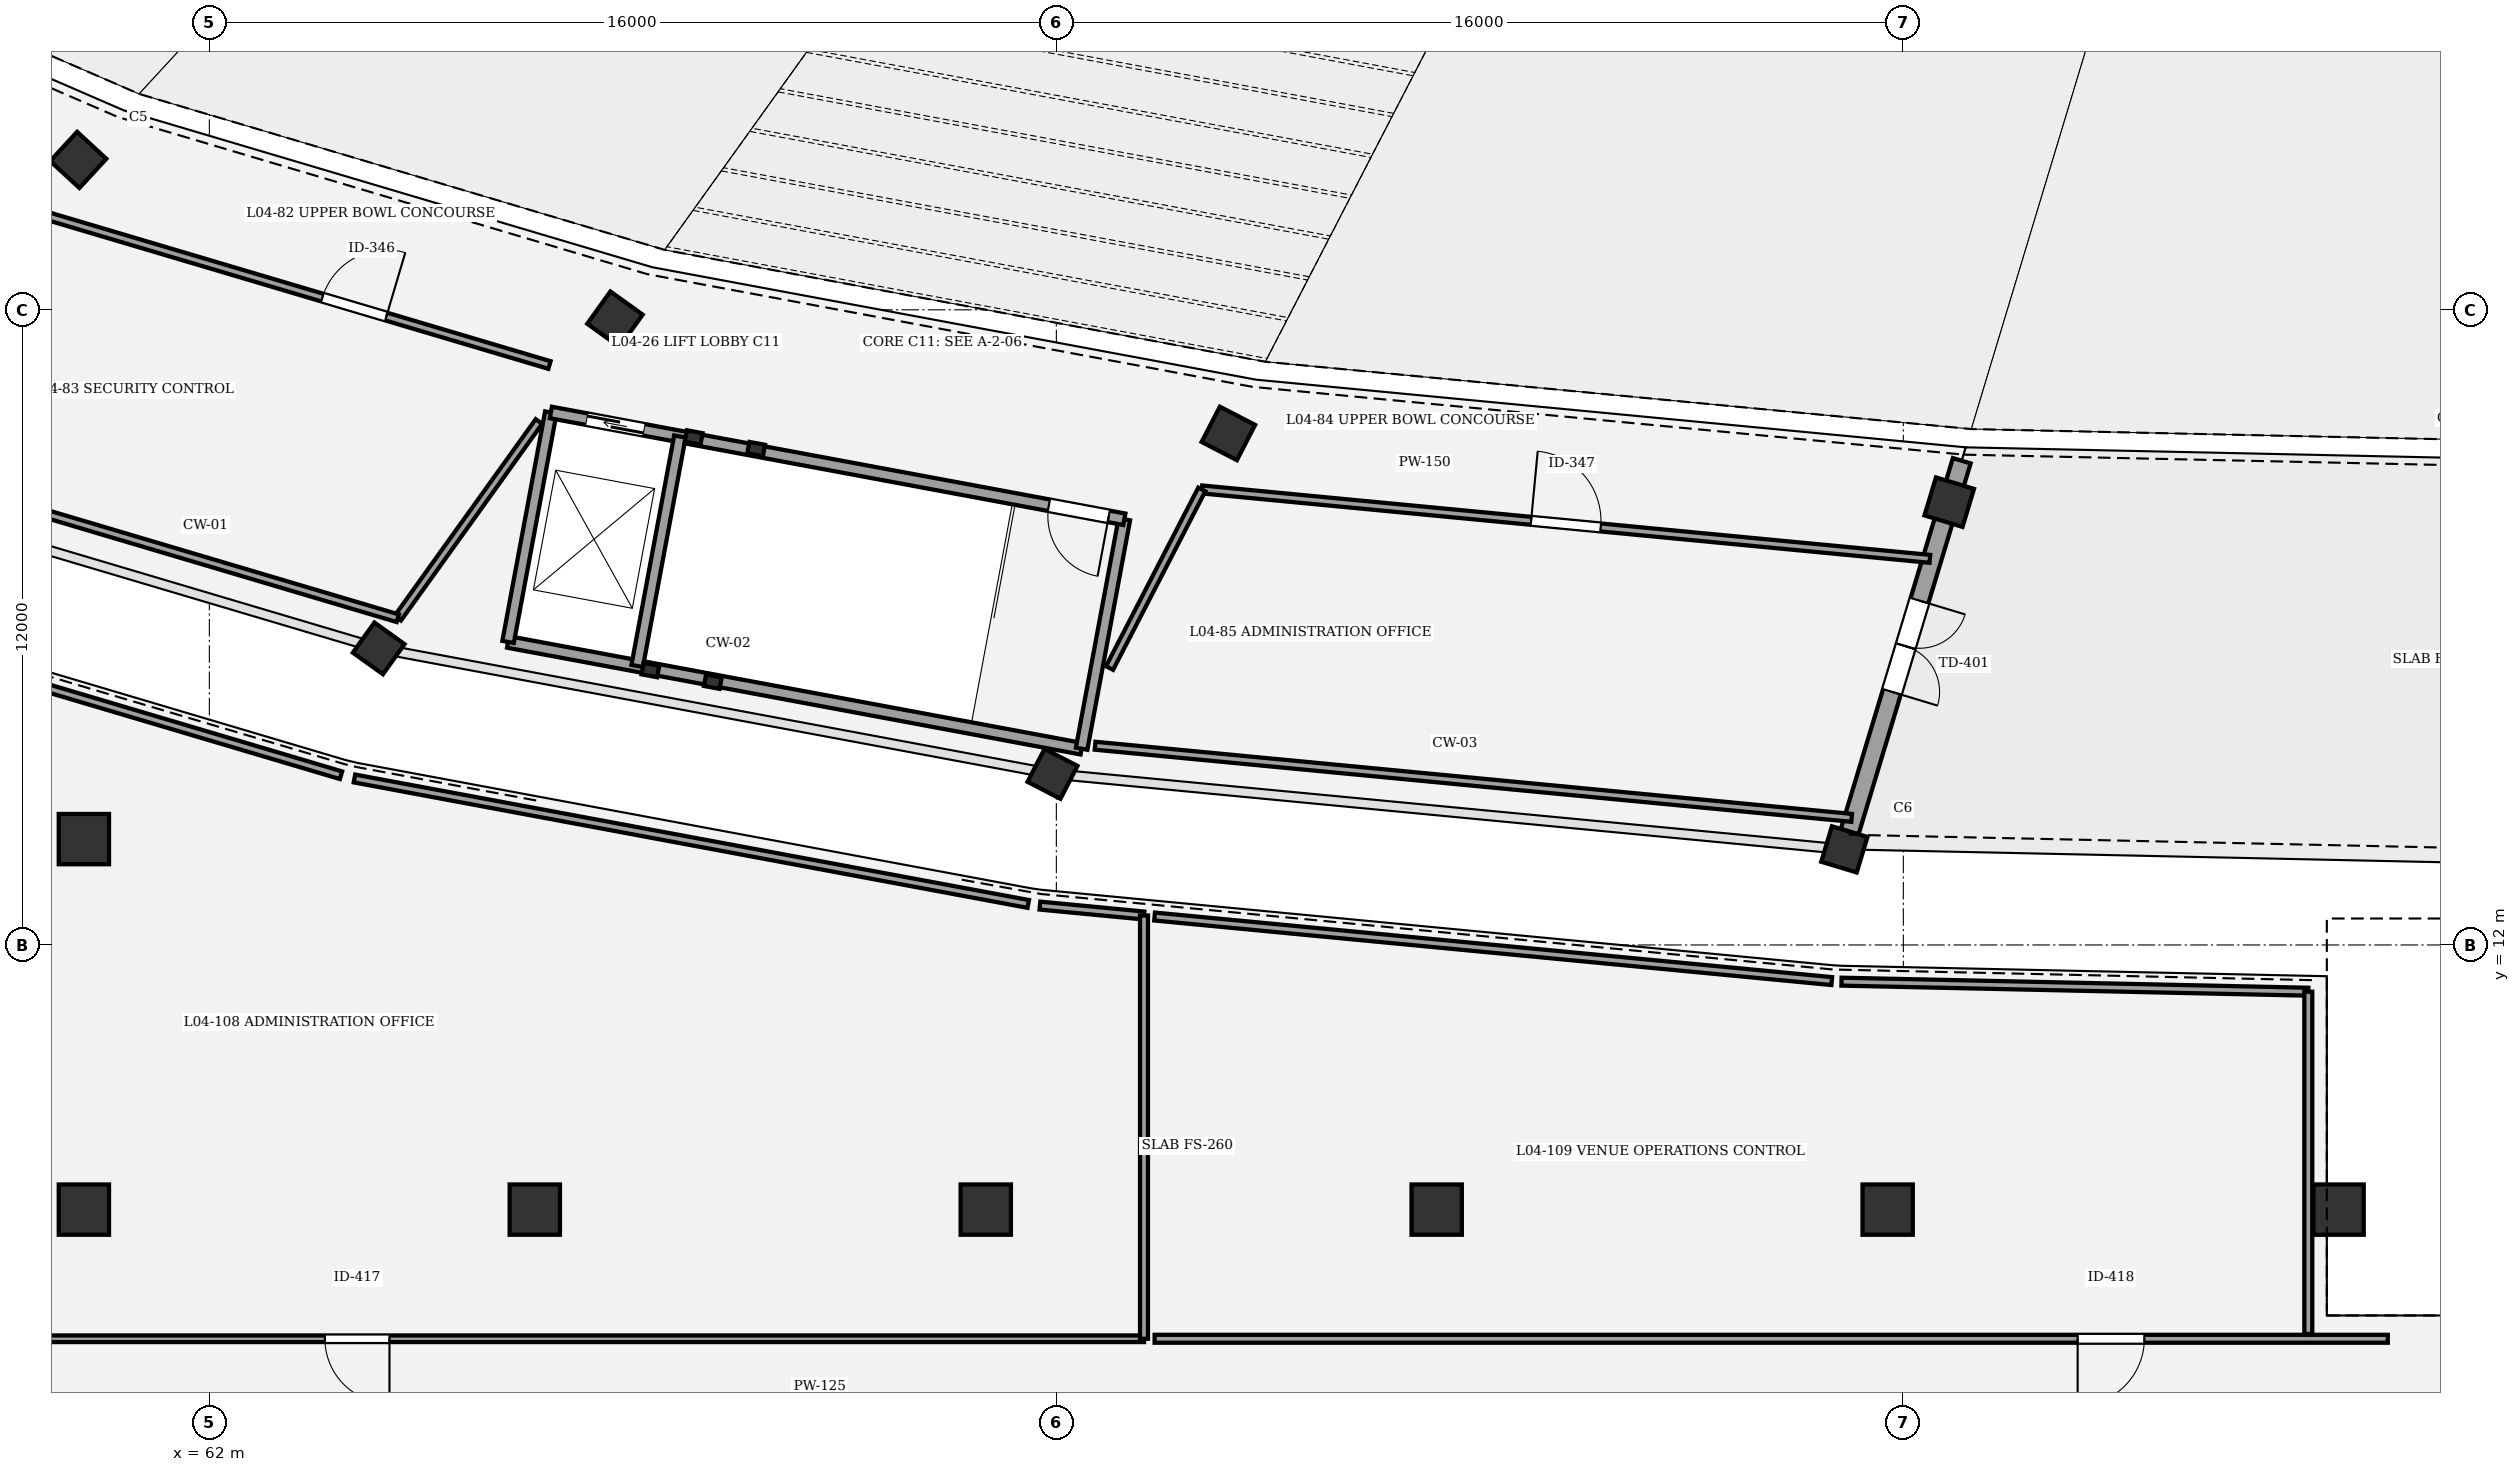
"""IFC4 building model, lengths in metres.
Left out: names, types, materials, properties, quantities, classifications, styles, units other than length and angle.
Written with IfcOpenShell. Run it as: python <this file> out.ifc"""

import sys

from ifc_helpers import new_model, si_unit, direction, frame, frame_2d, origin, origin_2d, place, context, subcontext, project, spatial, rectangle, circle, extrude, element, fill, save


model = new_model("IFC4")
c1 = context("Model", 3, precision=1e-05, world=origin(), true_north=direction((0.0, 1.0)))
c2 = subcontext(c1, "Body", "Model", "MODEL_VIEW")
j1 = project(units=[si_unit("LENGTHUNIT", "METRE"), si_unit("PLANEANGLEUNIT", "RADIAN")], contexts=[c1])
p1 = place(None, origin())
s1 = spatial("IfcSite", under=j1, at=p1, CompositionType="ELEMENT")
p2 = place(p1, origin())
s2 = spatial("IfcBuilding", under=s1, at=p2, CompositionType="ELEMENT")
p3 = place(p2, frame((0.0, 0.0, 19.2)))
s3 = spatial("IfcBuildingStorey", under=s2, at=p3, CompositionType="ELEMENT", Elevation=19.2)
for number, where, z_axis, x_axis in (
    (1, (59.524, 26.832, 0.0), (0.0, 0.0, 1.0), (-0.678, -0.735, 0.0)),
    (2, (69.662, 23.823, 0.0), (0.0, 0.0, 1.0), (-0.583, -0.812, 0.0)),
):
    element("IfcColumn", number, at=place(p3, frame(where, z_axis=z_axis, x_axis=x_axis)), inside=s3, PredefinedType="COLUMN", context=c2, shape_type="SweptSolid", body=[
        extrude(rectangle(XDim=0.75, YDim=0.75, at=origin_2d()), origin(), (0.0, 0.0, 1.0), 4.8),
    ])
p4 = place(p3, frame((65.199, 17.603, 0.0), z_axis=(0.0, 0.0, 1.0), x_axis=(-0.582974127943, -0.812490717577, 0.0)))
e3 = element("IfcColumn", 3, at=p4, inside=s3, PredefinedType="COLUMN", context=c2, shape_type="SweptSolid", body=[
    extrude(rectangle(XDim=0.7, YDim=0.7, at=origin_2d()), origin(), (0.0, 0.0, 1.0), 4.8),
])
p5 = place(p3, frame((81.25, 21.665, 0.0), z_axis=(0.0, 0.0, 1.0), x_axis=(-0.458959712465, -0.888457079624, 0.0)))
e4 = element("IfcColumn", 4, at=p5, inside=s3, PredefinedType="COLUMN", context=c2, shape_type="SweptSolid", body=[
    extrude(rectangle(XDim=0.75, YDim=0.75, at=origin_2d()), origin(), (0.0, 0.0, 1.0), 4.8),
])
p6 = place(p3, frame((77.927, 15.233, 0.0), z_axis=(0.0, 0.0, 1.0), x_axis=(-0.458959712465, -0.888457079624, 0.0)))
e5 = element("IfcColumn", 5, at=p6, inside=s3, PredefinedType="COLUMN", context=c2, shape_type="SweptSolid", body=[
    extrude(rectangle(XDim=0.7, YDim=0.7, at=origin_2d()), origin(), (0.0, 0.0, 1.0), 4.8),
])
p7 = place(p3, frame((94.867, 20.366, 0.0), z_axis=(0.0, 0.0, 1.0), x_axis=(-0.289198876314, -0.957269037387, 0.0)))
e6 = element("IfcColumn", 6, at=p7, inside=s3, PredefinedType="COLUMN", context=c2, shape_type="SweptSolid", body=[
    extrude(rectangle(XDim=0.75, YDim=0.75, at=origin_2d()), origin(), (0.0, 0.0, 1.0), 4.8),
])
p8 = place(p3, frame((92.885, 13.806, 0.0), z_axis=(0.0, 0.0, 1.0), x_axis=(-0.289198876314, -0.957269037387, 0.0)))
e7 = element("IfcColumn", 7, at=p8, inside=s3, PredefinedType="COLUMN", context=c2, shape_type="SweptSolid", body=[
    extrude(rectangle(XDim=0.7, YDim=0.7, at=origin_2d()), origin(), (0.0, 0.0, 1.0), 4.8),
])
for number, where, z_axis, x_axis in (
    (8, (59.63, 7.0, 0.0), (0.0, 0.0, 1.0), (1.0, 0.0, 0.0)),
    (9, (59.63, 14.0, 0.0), (0.0, 0.0, 1.0), (1.0, 0.0, 0.0)),
    (10, (68.148, 7.0, 0.0), (0.0, 0.0, 1.0), (1.0, 0.0, 0.0)),
    (11, (76.667, 7.0, 0.0), (0.0, 0.0, 1.0), (1.0, 0.0, 0.0)),
    (12, (85.185, 7.0, 0.0), (0.0, 0.0, 1.0), (1.0, 0.0, 0.0)),
    (13, (93.704, 7.0, 0.0), (0.0, 0.0, 1.0), (1.0, 0.0, 0.0)),
    (14, (102.222, 7.0, 0.0), (0.0, 0.0, 1.0), (1.0, 0.0, 0.0)),
):
    element("IfcColumn", number, at=place(p3, frame(where, z_axis=z_axis, x_axis=x_axis)), inside=s3, PredefinedType="COLUMN", context=c2, shape_type="SweptSolid", body=[
        extrude(circle(Radius=0.475, at=origin_2d()), origin(), (0.0, 0.0, 1.0), 4.8),
    ])
p9 = place(p3, frame((95.104, 21.149, 0.0), z_axis=(0.0, 0.0, 1.0), x_axis=(-0.28924385285, -0.957255448451, 0.0)))
e15 = element("IfcWall", 15, at=p9, inside=s3, PredefinedType="STANDARD", context=c2, shape_type="SweptSolid", body=[
    extrude(rectangle(XDim=7.322, YDim=0.35, at=frame_2d((3.661, 0.0))), origin(), (0.0, 0.0, 1.0), 3.55),
])
p10 = place(p9, frame((2.761, 0.0, 0.0)))
e16 = element("IfcOpeningElement", 16, at=p10, cuts=e15, PredefinedType="OPENING", context=c2, shape_type="SweptSolid", body=[
    extrude(rectangle(XDim=1.8, YDim=2.25, at=frame_2d((0.9, 1.125))), frame((0.0, 0.185, 0.0), z_axis=(0.0, -1.0, 0.0), x_axis=(1.0, 0.0, 0.0)), (0.0, 0.0, 1.0), 0.37),
])
for number, where, z_axis, x_axis in (
    (17, (72.33, 21.369, 0.0), (0.0, 0.0, 1.0), (-0.983, 0.183, 0.0)),
    (18, (71.15, 21.588, 0.0), (0.0, 0.0, 1.0), (-0.983, 0.183, 0.0)),
    (19, (70.332, 17.194, 0.0), (0.0, 0.0, 1.0), (-0.983, 0.183, 0.0)),
    (20, (71.511, 16.974, 0.0), (0.0, 0.0, 1.0), (-0.983, 0.183, 0.0)),
):
    element("IfcColumn", number, at=place(p3, frame(where, z_axis=z_axis, x_axis=x_axis)), inside=s3, PredefinedType="COLUMN", context=c2, shape_type="SweptSolid", body=[
        extrude(rectangle(XDim=0.3, YDim=0.22, at=origin_2d()), origin(), (0.0, 0.0, 1.0), 4.8),
    ])
p11 = place(p3, frame((78.477, 15.707, 0.0), z_axis=(0.0, 0.0, 1.0), x_axis=(-0.983093434234, 0.183104613723, 0.0)))
e21 = element("IfcWall", 21, at=p11, inside=s3, PredefinedType="SHEAR", context=c2, shape_type="SweptSolid", body=[
    extrude(rectangle(XDim=11.02, YDim=0.22, at=frame_2d((5.51, 0.0))), origin(), (0.0, 0.0, 1.0), 4.55),
])
for number, where, z_axis, x_axis in (
    (22, (79.285, 20.043, 0.0), (0.0, 0.0, 1.0), (-0.183, -0.983, 0.0)),
    (23, (68.451, 22.061, 0.0), (0.0, 0.0, 1.0), (-0.183, -0.983, 0.0)),
):
    element("IfcWall", number, at=place(p3, frame(where, z_axis=z_axis, x_axis=x_axis)), inside=s3, PredefinedType="SHEAR", context=c2, shape_type="SweptSolid", body=[
        extrude(rectangle(XDim=4.41, YDim=0.22, at=frame_2d((2.205, 0.0))), origin(), (0.0, 0.0, 1.0), 4.55),
    ])
p12 = place(p3, frame((79.285, 20.043, 0.0), z_axis=(0.0, 0.0, 1.0), x_axis=(-0.983093434234, 0.183104613723, 0.0)))
e24 = element("IfcWall", 24, at=p12, inside=s3, PredefinedType="SHEAR", context=c2, shape_type="SweptSolid", body=[
    extrude(rectangle(XDim=11.02, YDim=0.22, at=frame_2d((5.51, 0.0))), origin(), (0.0, 0.0, 1.0), 4.55),
])
p13 = place(p12, frame((0.3, 0.0, 0.0)))
e25 = element("IfcOpeningElement", 25, at=p13, cuts=e24, PredefinedType="OPENING", context=c2, shape_type="SweptSolid", body=[
    extrude(rectangle(XDim=1.15, YDim=2.15, at=frame_2d((0.575, 1.075))), frame((0.0, 0.12, 0.0), z_axis=(0.0, -1.0, 0.0), x_axis=(1.0, 0.0, 0.0)), (0.0, 0.0, 1.0), 0.24),
])
p14 = place(p12, frame((9.23, 0.0, 0.0)))
e26 = element("IfcOpeningElement", 26, at=p14, cuts=e24, PredefinedType="OPENING", context=c2, shape_type="SweptSolid", body=[
    extrude(rectangle(XDim=1.1, YDim=2.15, at=frame_2d((0.55, 1.075))), frame((0.0, 0.12, 0.0), z_axis=(0.0, -1.0, 0.0), x_axis=(1.0, 0.0, 0.0)), (0.0, 0.0, 1.0), 0.24),
])
p15 = place(p3, frame((70.889, 21.606, 0.0), z_axis=(0.0, 0.0, 1.0), x_axis=(-0.183078394814, -0.983098317236, 0.0)))
e27 = element("IfcWall", 27, at=p15, inside=s3, PredefinedType="SHEAR", context=c2, shape_type="SweptSolid", body=[
    extrude(rectangle(XDim=4.41, YDim=0.22, at=frame_2d((2.205, 0.0))), origin(), (0.0, 0.0, 1.0), 4.55),
])
p16 = place(p3, frame((58.674, 25.851, 0.0), z_axis=(0.0, 0.0, 1.0), x_axis=(0.95865924659, -0.284556582997, 0.0)))
e28 = element("IfcWall", 28, at=p16, inside=s3, PredefinedType="PARTITIONING", context=c2, shape_type="SweptSolid", body=[
    extrude(rectangle(XDim=10.171, YDim=0.15, at=frame_2d((5.085, 0.0))), origin(), (0.0, 0.0, 1.0), 3.55),
])
p17 = place(p16, frame((5.696, 0.0, 0.0)))
e29 = element("IfcOpeningElement", 29, at=p17, cuts=e28, PredefinedType="OPENING", context=c2, shape_type="SweptSolid", body=[
    extrude(rectangle(XDim=1.26, YDim=2.2, at=frame_2d((0.63, 1.1))), frame((0.0, 0.085, 0.0), z_axis=(0.0, -1.0, 0.0), x_axis=(1.0, 0.0, 0.0)), (0.0, 0.0, 1.0), 0.17),
])
p18 = place(p3, frame((80.748, 20.607, 0.0), z_axis=(0.0, 0.0, 1.0), x_axis=(0.99548251799, -0.094945017647, 0.0)))
e30 = element("IfcWall", 30, at=p18, inside=s3, PredefinedType="PARTITIONING", context=c2, shape_type="SweptSolid", body=[
    extrude(rectangle(XDim=13.816, YDim=0.15, at=frame_2d((6.908, 0.0))), origin(), (0.0, 0.0, 1.0), 3.55),
])
p19 = place(p18, frame((6.248, 0.0, 0.0)))
e31 = element("IfcOpeningElement", 31, at=p19, cuts=e30, PredefinedType="OPENING", context=c2, shape_type="SweptSolid", body=[
    extrude(rectangle(XDim=1.32, YDim=2.2, at=frame_2d((0.66, 1.1))), frame((0.0, 0.085, 0.0), z_axis=(0.0, -1.0, 0.0), x_axis=(1.0, 0.0, 0.0)), (0.0, 0.0, 1.0), 0.17),
])
p20 = place(p3, frame((79.656, 4.56, 0.0), z_axis=(0.0, 0.0, 1.0), x_axis=(-1.0, 0.0, 0.0)))
e32 = element("IfcWall", 32, at=p20, inside=s3, PredefinedType="PARTITIONING", context=c2, shape_type="SweptSolid", body=[
    extrude(rectangle(XDim=23.296, YDim=0.125, at=frame_2d((11.648, 0.0))), origin(), (0.0, 0.0, 1.0), 3.55),
])
p21 = place(p20, frame((14.253, 0.0, 0.0)))
e33 = element("IfcOpeningElement", 33, at=p21, cuts=e32, PredefinedType="OPENING", context=c2, shape_type="SweptSolid", body=[
    extrude(rectangle(XDim=1.22, YDim=2.2, at=frame_2d((0.61, 1.1))), frame((0.0, 0.073, 0.0), z_axis=(0.0, -1.0, 0.0), x_axis=(1.0, 0.0, 0.0)), (0.0, 0.0, 1.0), 0.145),
])
p22 = place(p3, frame((103.152, 4.56, 0.0), z_axis=(0.0, 0.0, 1.0), x_axis=(-1.0, 0.0, 0.0)))
e34 = element("IfcWall", 34, at=p22, inside=s3, PredefinedType="PARTITIONING", context=c2, shape_type="SweptSolid", body=[
    extrude(rectangle(XDim=23.296, YDim=0.15, at=frame_2d((11.648, 0.0))), origin(), (0.0, 0.0, 1.0), 3.55),
])
p23 = place(p22, frame((4.599, 0.0, 0.0)))
e35 = element("IfcOpeningElement", 35, at=p23, cuts=e34, PredefinedType="OPENING", context=c2, shape_type="SweptSolid", body=[
    extrude(rectangle(XDim=1.26, YDim=2.2, at=frame_2d((0.63, 1.1))), frame((0.0, 0.085, 0.0), z_axis=(0.0, -1.0, 0.0), x_axis=(1.0, 0.0, 0.0)), (0.0, 0.0, 1.0), 0.17),
])
p24 = place(p3, frame((68.226, 21.89, 0.0), z_axis=(0.0, 0.0, 1.0), x_axis=(-0.583018940517, -0.812458562019, 0.0)))
e36 = element("IfcWall", 36, at=p24, inside=s3, PredefinedType="PARTITIONING", context=c2, shape_type="SweptSolid", body=[
    extrude(rectangle(XDim=4.574, YDim=0.15, at=frame_2d((2.287, 0.0))), origin(), (0.0, 0.0, 1.0), 3.55),
])
p25 = place(p3, frame((65.559, 18.173, 0.0), z_axis=(0.0, 0.0, 1.0), x_axis=(-0.958657149099, 0.284563649264, 0.0)))
e37 = element("IfcWall", 37, at=p25, inside=s3, PredefinedType="PARTITIONING", context=c2, shape_type="SweptSolid", body=[
    extrude(rectangle(XDim=11.437, YDim=0.15, at=frame_2d((5.718, 0.0))), origin(), (0.0, 0.0, 1.0), 3.55),
])
p26 = place(p3, frame((79.005, 17.233, 0.0), z_axis=(0.0, 0.0, 1.0), x_axis=(0.45895239375, 0.888460860292, 0.0)))
e38 = element("IfcWall", 38, at=p26, inside=s3, PredefinedType="PARTITIONING", context=c2, shape_type="SweptSolid", body=[
    extrude(rectangle(XDim=3.798, YDim=0.15, at=frame_2d((1.899, 0.0))), origin(), (0.0, 0.0, 1.0), 3.55),
])
p27 = place(p3, frame((93.023, 14.402, 0.0), z_axis=(0.0, 0.0, 1.0), x_axis=(-0.99548430685, 0.09492625988, 0.0)))
e39 = element("IfcWall", 39, at=p27, inside=s3, PredefinedType="PARTITIONING", context=c2, shape_type="SweptSolid", body=[
    extrude(rectangle(XDim=14.356, YDim=0.15, at=frame_2d((7.178, 0.0))), origin(), (0.0, 0.0, 1.0), 3.55),
])
p28 = place(p3, frame((64.741, 15.146, 0.0), z_axis=(0.0, 0.0, 1.0), x_axis=(0.983094545276, -0.183098648406, 0.0)))
e40 = element("IfcWall", 40, at=p28, inside=s3, PredefinedType="PARTITIONING", context=c2, shape_type="SweptSolid", body=[
    extrude(rectangle(XDim=12.947, YDim=0.15, at=frame_2d((6.474, 0.0))), origin(), (0.0, 0.0, 1.0), 3.55),
])
p29 = place(p3, frame((77.69, 12.744, 0.0), z_axis=(0.0, 0.0, 1.0), x_axis=(0.995483241572, -0.094937430712, 0.0)))
e41 = element("IfcWall", 41, at=p29, inside=s3, PredefinedType="PARTITIONING", context=c2, shape_type="SweptSolid", body=[
    extrude(rectangle(XDim=1.975, YDim=0.15, at=frame_2d((0.988, 0.0))), origin(), (0.0, 0.0, 1.0), 3.55),
])
p30 = place(p3, frame((79.656, 12.556, 0.0), z_axis=(0.0, 0.0, 1.0), x_axis=(0.0, -1.0, 0.0)))
e42 = element("IfcWall", 42, at=p30, inside=s3, PredefinedType="PARTITIONING", context=c2, shape_type="SweptSolid", body=[
    extrude(rectangle(XDim=7.996, YDim=0.15, at=frame_2d((3.998, 0.0))), origin(), (0.0, 0.0, 1.0), 3.55),
])
p31 = place(p3, frame((56.36, 17.619, 0.0), z_axis=(0.0, 0.0, 1.0), x_axis=(0.95866000112, -0.284554041006, 0.0)))
e43 = element("IfcWall", 43, at=p31, inside=s3, PredefinedType="PARTITIONING", context=c2, shape_type="SweptSolid", body=[
    extrude(rectangle(XDim=8.478, YDim=0.15, at=frame_2d((4.239, 0.0))), origin(), (0.0, 0.0, 1.0), 3.55),
])
p32 = place(p3, frame((92.832, 11.307, 0.0), z_axis=(0.0, 0.0, 1.0), x_axis=(0.999768109674, -0.021534318641, 0.0)))
e44 = element("IfcWall", 44, at=p32, inside=s3, PredefinedType="PARTITIONING", context=c2, shape_type="SweptSolid", body=[
    extrude(rectangle(XDim=8.82, YDim=0.15, at=frame_2d((4.41, 0.0))), origin(), (0.0, 0.0, 1.0), 3.55),
])
p33 = place(p3, frame((101.65, 11.117, 0.0), z_axis=(0.0, 0.0, 1.0), x_axis=(0.0, -1.0, 0.0)))
e45 = element("IfcWall", 45, at=p33, inside=s3, PredefinedType="PARTITIONING", context=c2, shape_type="SweptSolid", body=[
    extrude(rectangle(XDim=6.467, YDim=0.15, at=frame_2d((3.233, 0.0))), origin(), (0.0, 0.0, 1.0), 3.55),
])
p34 = place(p3, frame((79.856, 12.537, 0.0), z_axis=(0.0, 0.0, 1.0), x_axis=(0.995483253835, -0.094937302124, 0.0)))
e46 = element("IfcWall", 46, at=p34, inside=s3, PredefinedType="PARTITIONING", context=c2, shape_type="SweptSolid", body=[
    extrude(rectangle(XDim=12.85, YDim=0.15, at=frame_2d((6.425, 0.0))), origin(), (0.0, 0.0, 1.0), 3.55),
])
p35 = place(p10, origin())
e47 = element("IfcDoor", 47, at=p35, inside=s3, OperationType="DOUBLE_DOOR_SINGLE_SWING", PredefinedType="DOOR", context=c2, shape_type="SweptSolid", body=[
    extrude(rectangle(XDim=1.8, YDim=2.25, at=frame_2d((0.9, 1.125))), frame((0.0, 0.025, 0.0), z_axis=(0.0, -1.0, 0.0), x_axis=(1.0, 0.0, 0.0)), (0.0, 0.0, 1.0), 0.05),
])
fill(e16, e47)
p36 = place(p13, origin())
e48 = element("IfcDoor", 48, at=p36, inside=s3, OperationType="SINGLE_SWING_LEFT", PredefinedType="DOOR", context=c2, shape_type="SweptSolid", body=[
    extrude(rectangle(XDim=1.15, YDim=2.15, at=frame_2d((0.575, 1.075))), frame((0.0, 0.025, 0.0), z_axis=(0.0, -1.0, 0.0), x_axis=(1.0, 0.0, 0.0)), (0.0, 0.0, 1.0), 0.05),
])
fill(e25, e48)
p37 = place(p14, origin())
e49 = element("IfcDoor", 49, at=p37, inside=s3, OperationType="DOUBLE_DOOR_SLIDING", PredefinedType="DOOR", context=c2, shape_type="SweptSolid", body=[
    extrude(rectangle(XDim=1.1, YDim=2.15, at=frame_2d((0.55, 1.075))), frame((0.0, 0.025, 0.0), z_axis=(0.0, -1.0, 0.0), x_axis=(1.0, 0.0, 0.0)), (0.0, 0.0, 1.0), 0.05),
])
fill(e26, e49)
p38 = place(p17, origin())
e50 = element("IfcDoor", 50, at=p38, inside=s3, OperationType="SINGLE_SWING_RIGHT", PredefinedType="DOOR", context=c2, shape_type="SweptSolid", body=[
    extrude(rectangle(XDim=1.26, YDim=2.2, at=frame_2d((0.63, 1.1))), frame((0.0, 0.025, 0.0), z_axis=(0.0, -1.0, 0.0), x_axis=(1.0, 0.0, 0.0)), (0.0, 0.0, 1.0), 0.05),
])
fill(e29, e50)
p39 = place(p19, origin())
e51 = element("IfcDoor", 51, at=p39, inside=s3, OperationType="SINGLE_SWING_LEFT", PredefinedType="DOOR", context=c2, shape_type="SweptSolid", body=[
    extrude(rectangle(XDim=1.32, YDim=2.2, at=frame_2d((0.66, 1.1))), frame((0.0, 0.025, 0.0), z_axis=(0.0, -1.0, 0.0), x_axis=(1.0, 0.0, 0.0)), (0.0, 0.0, 1.0), 0.05),
])
fill(e31, e51)
p40 = place(p21, origin())
e52 = element("IfcDoor", 52, at=p40, inside=s3, OperationType="SINGLE_SWING_LEFT", PredefinedType="DOOR", context=c2, shape_type="SweptSolid", body=[
    extrude(rectangle(XDim=1.22, YDim=2.2, at=frame_2d((0.61, 1.1))), frame((0.0, 0.025, 0.0), z_axis=(0.0, -1.0, 0.0), x_axis=(1.0, 0.0, 0.0)), (0.0, 0.0, 1.0), 0.05),
])
fill(e33, e52)
p41 = place(p23, origin())
e53 = element("IfcDoor", 53, at=p41, inside=s3, OperationType="SINGLE_SWING_RIGHT", PredefinedType="DOOR", context=c2, shape_type="SweptSolid", body=[
    extrude(rectangle(XDim=1.26, YDim=2.2, at=frame_2d((0.63, 1.1))), frame((0.0, 0.025, 0.0), z_axis=(0.0, -1.0, 0.0), x_axis=(1.0, 0.0, 0.0)), (0.0, 0.0, 1.0), 0.05),
])
fill(e35, e53)
save(model, sys.argv[1])
